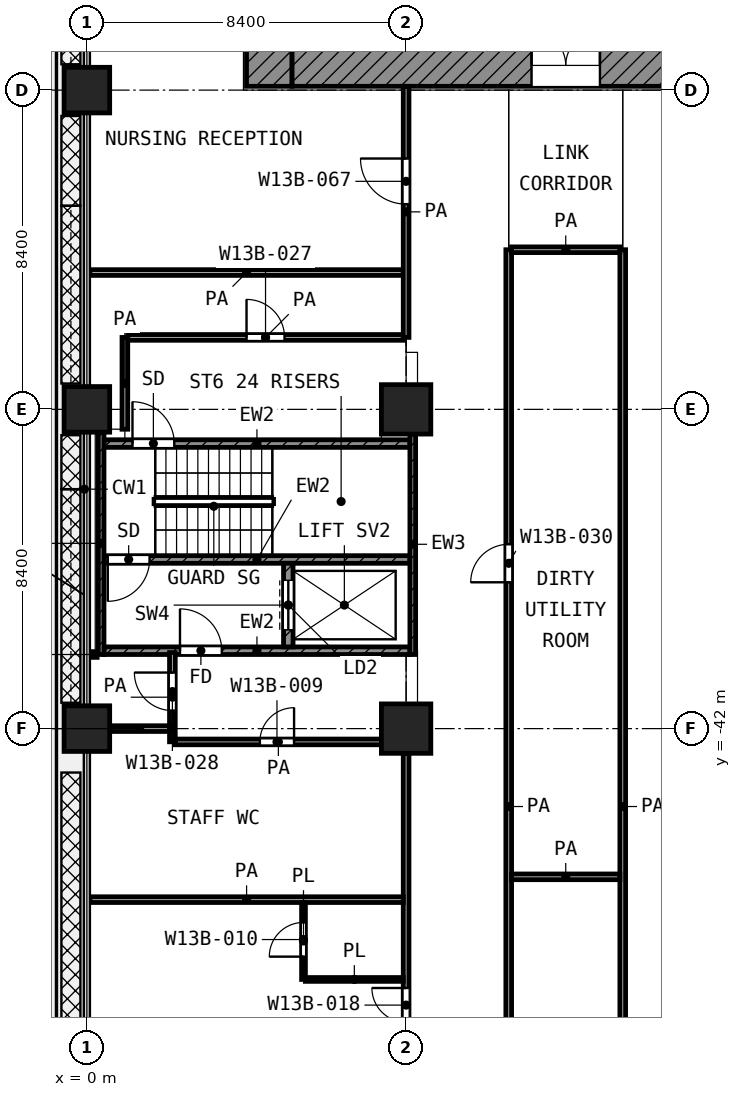
"""IFC4 building model, lengths in metres.
Left out: names, types, materials, properties, quantities, classifications, styles, units other than length and angle.
Written with IfcOpenShell. Run it as: python <this file> out.ifc"""

import sys

from ifc_helpers import new_model, si_unit, direction, frame, frame_2d, origin, origin_2d, place, context, subcontext, project, spatial, rectangle, extrude, element, fill, save


model = new_model("IFC4")
c1 = context("Model", 3, precision=1e-05, world=origin(), true_north=direction((0.0, 1.0)))
c2 = subcontext(c1, "Body", "Model", "MODEL_VIEW")
j1 = project(units=[si_unit("LENGTHUNIT", "METRE"), si_unit("PLANEANGLEUNIT", "RADIAN")], contexts=[c1])
p1 = place(None, origin())
s1 = spatial("IfcSite", under=j1, at=p1, CompositionType="ELEMENT")
p2 = place(p1, origin())
s2 = spatial("IfcBuilding", under=s1, at=p2, CompositionType="ELEMENT")
p3 = place(p2, frame((0.0, 0.0, 89.6)))
s3 = spatial("IfcBuildingStorey", under=s2, at=p3, CompositionType="ELEMENT", Elevation=89.6)
for number, where, z_axis, x_axis in (
    (1, (0.0, -25.2, 0.0), (0.0, 0.0, 1.0), (1.0, 0.0, 0.0)),
    (2, (0.0, -33.6, 0.0), (0.0, 0.0, 1.0), (1.0, 0.0, 0.0)),
):
    element("IfcColumn", number, at=place(p3, frame(where, z_axis=z_axis, x_axis=x_axis)), inside=s3, PredefinedType="COLUMN", context=c2, shape_type="SweptSolid", body=[
        extrude(rectangle(XDim=1.2, YDim=1.2, at=origin_2d()), origin(), (0.0, 0.0, 1.0), 4.2),
    ])
p4 = place(p3, frame((8.4, -33.6, 0.0), z_axis=(0.0, 0.0, 1.0), x_axis=(1.0, 0.0, 0.0)))
e3 = element("IfcColumn", 3, at=p4, inside=s3, PredefinedType="COLUMN", context=c2, shape_type="SweptSolid", body=[
    extrude(rectangle(XDim=1.3, YDim=1.3, at=origin_2d()), origin(), (0.0, 0.0, 1.0), 4.2),
])
p5 = place(p3, frame((0.0, -42.0, 0.0), z_axis=(0.0, 0.0, 1.0), x_axis=(1.0, 0.0, 0.0)))
e4 = element("IfcColumn", 4, at=p5, inside=s3, PredefinedType="COLUMN", context=c2, shape_type="SweptSolid", body=[
    extrude(rectangle(XDim=1.2, YDim=1.2, at=origin_2d()), origin(), (0.0, 0.0, 1.0), 4.2),
])
p6 = place(p3, frame((8.4, -42.0, 0.0), z_axis=(0.0, 0.0, 1.0), x_axis=(1.0, 0.0, 0.0)))
e5 = element("IfcColumn", 5, at=p6, inside=s3, PredefinedType="COLUMN", context=c2, shape_type="SweptSolid", body=[
    extrude(rectangle(XDim=1.3, YDim=1.3, at=origin_2d()), origin(), (0.0, 0.0, 1.0), 4.2),
])
p7 = place(p3, frame((4.8, -25.1, 0.0), z_axis=(0.0, 0.0, 1.0), x_axis=(0.0, 1.0, 0.0)))
e6 = element("IfcWall", 6, at=p7, inside=s3, PredefinedType="SHEAR", context=c2, shape_type="SweptSolid", body=[
    extrude(rectangle(XDim=19.7, YDim=1.2, at=frame_2d((9.85, 0.0))), origin(), (0.0, 0.0, 1.0), 3.7),
])
p8 = place(p7, frame((11.55, 0.0, 0.0)))
e7 = element("IfcOpeningElement", 7, at=p8, cuts=e6, PredefinedType="OPENING", context=c2, shape_type="SweptSolid", body=[
    extrude(rectangle(XDim=1.1, YDim=2.1, at=frame_2d((0.55, 1.05))), frame((0.0, 0.61, 0.0), z_axis=(0.0, -1.0, 0.0), x_axis=(1.0, 0.0, 0.0)), (0.0, 0.0, 1.0), 1.22),
])
p9 = place(p7, frame((2.25, 0.0, 0.0)))
e8 = element("IfcOpeningElement", 8, at=p9, cuts=e6, PredefinedType="OPENING", context=c2, shape_type="SweptSolid", body=[
    extrude(rectangle(XDim=1.1, YDim=2.1, at=frame_2d((0.55, 1.05))), frame((0.0, 0.61, 0.0), z_axis=(0.0, -1.0, 0.0), x_axis=(1.0, 0.0, 0.0)), (0.0, 0.0, 1.0), 1.22),
])
p10 = place(p3, frame((5.4, -24.55, 0.0), z_axis=(0.0, 0.0, 1.0), x_axis=(1.0, 0.0, 0.0)))
e9 = element("IfcWall", 9, at=p10, inside=s3, PredefinedType="SHEAR", context=c2, shape_type="SweptSolid", body=[
    extrude(rectangle(XDim=18.6, YDim=1.1, at=frame_2d((9.3, 0.0))), origin(), (0.0, 0.0, 1.0), 3.7),
])
p11 = place(p10, frame((6.3, 0.0, 0.0)))
e10 = element("IfcOpeningElement", 10, at=p11, cuts=e9, PredefinedType="OPENING", context=c2, shape_type="SweptSolid", body=[
    extrude(rectangle(XDim=1.8, YDim=2.1, at=frame_2d((0.9, 1.05))), frame((0.0, 0.56, 0.0), z_axis=(0.0, -1.0, 0.0), x_axis=(1.0, 0.0, 0.0)), (0.0, 0.0, 1.0), 1.12),
])
p12 = place(p3, frame((0.375, -40.05, 0.0), z_axis=(0.0, 0.0, 1.0), x_axis=(0.0, 1.0, 0.0)))
e11 = element("IfcWall", 11, at=p12, inside=s3, PredefinedType="SHEAR", context=c2, shape_type="SweptSolid", body=[
    extrude(rectangle(XDim=5.85, YDim=0.15, at=frame_2d((2.925, 0.0))), origin(), (0.0, 0.0, 1.0), 3.7),
])
p13 = place(p3, frame((8.575, -40.05, 0.0), z_axis=(0.0, 0.0, 1.0), x_axis=(0.0, 1.0, 0.0)))
e12 = element("IfcWall", 12, at=p13, inside=s3, PredefinedType="SHEAR", context=c2, shape_type="SweptSolid", body=[
    extrude(rectangle(XDim=5.8, YDim=0.15, at=frame_2d((2.9, 0.0))), origin(), (0.0, 0.0, 1.0), 3.7),
])
p14 = place(p3, frame((0.45, -34.5, 0.0), z_axis=(0.0, 0.0, 1.0), x_axis=(1.0, 0.0, 0.0)))
e13 = element("IfcWall", 13, at=p14, inside=s3, PredefinedType="SHEAR", context=c2, shape_type="SweptSolid", body=[
    extrude(rectangle(XDim=8.05, YDim=0.2, at=frame_2d((4.025, 0.0))), origin(), (0.0, 0.0, 1.0), 3.7),
])
p15 = place(p14, frame((0.75, 0.0, 0.0)))
e14 = element("IfcOpeningElement", 14, at=p15, cuts=e13, PredefinedType="OPENING", context=c2, shape_type="SweptSolid", body=[
    extrude(rectangle(XDim=1.1, YDim=2.1, at=frame_2d((0.55, 1.05))), frame((0.0, 0.11, 0.0), z_axis=(0.0, -1.0, 0.0), x_axis=(1.0, 0.0, 0.0)), (0.0, 0.0, 1.0), 0.22),
])
p16 = place(p3, frame((0.45, -37.55, 0.0), z_axis=(0.0, 0.0, 1.0), x_axis=(1.0, 0.0, 0.0)))
e15 = element("IfcWall", 15, at=p16, inside=s3, PredefinedType="SHEAR", context=c2, shape_type="SweptSolid", body=[
    extrude(rectangle(XDim=8.05, YDim=0.2, at=frame_2d((4.025, 0.0))), origin(), (0.0, 0.0, 1.0), 3.7),
])
p17 = place(p16, frame((0.1, 0.0, 0.0)))
e16 = element("IfcOpeningElement", 16, at=p17, cuts=e15, PredefinedType="OPENING", context=c2, shape_type="SweptSolid", body=[
    extrude(rectangle(XDim=1.1, YDim=2.1, at=frame_2d((0.55, 1.05))), frame((0.0, 0.11, 0.0), z_axis=(0.0, -1.0, 0.0), x_axis=(1.0, 0.0, 0.0)), (0.0, 0.0, 1.0), 0.22),
])
p18 = place(p3, frame((0.45, -39.95, 0.0), z_axis=(0.0, 0.0, 1.0), x_axis=(1.0, 0.0, 0.0)))
e17 = element("IfcWall", 17, at=p18, inside=s3, PredefinedType="SHEAR", context=c2, shape_type="SweptSolid", body=[
    extrude(rectangle(XDim=8.05, YDim=0.2, at=frame_2d((4.025, 0.0))), origin(), (0.0, 0.0, 1.0), 3.7),
])
p19 = place(p18, frame((2.0, 0.0, 0.0)))
e18 = element("IfcOpeningElement", 18, at=p19, cuts=e17, PredefinedType="OPENING", context=c2, shape_type="SweptSolid", body=[
    extrude(rectangle(XDim=1.1, YDim=2.1, at=frame_2d((0.55, 1.05))), frame((0.0, 0.11, 0.0), z_axis=(0.0, -1.0, 0.0), x_axis=(1.0, 0.0, 0.0)), (0.0, 0.0, 1.0), 0.22),
])
p20 = place(p3, frame((5.3, -39.85, 0.0), z_axis=(0.0, 0.0, 1.0), x_axis=(0.0, 1.0, 0.0)))
e19 = element("IfcWall", 19, at=p20, inside=s3, PredefinedType="SHEAR", context=c2, shape_type="SweptSolid", body=[
    extrude(rectangle(XDim=2.2, YDim=0.25, at=frame_2d((1.1, 0.0))), origin(), (0.0, 0.0, 1.0), 3.7),
])
p21 = place(p20, frame((0.45, 0.0, 0.0)))
e20 = element("IfcOpeningElement", 20, at=p21, cuts=e19, PredefinedType="OPENING", context=c2, shape_type="SweptSolid", body=[
    extrude(rectangle(XDim=1.3, YDim=2.1, at=frame_2d((0.65, 1.05))), frame((0.0, 0.135, 0.0), z_axis=(0.0, -1.0, 0.0), x_axis=(1.0, 0.0, 0.0)), (0.0, 0.0, 1.0), 0.27),
])
p22 = place(p3, frame((5.75, -48.6, 0.0), z_axis=(0.0, 0.0, 1.0), x_axis=(1.0, 0.0, 0.0)))
e21 = element("IfcWall", 21, at=p22, inside=s3, PredefinedType="PARTITIONING", context=c2, shape_type="SweptSolid", body=[
    extrude(rectangle(XDim=2.575, YDim=0.1, at=frame_2d((1.288, 0.0))), origin(), (0.0, 0.0, 1.0), 3.7),
])
p23 = place(p3, frame((5.7, -48.6, 0.0), z_axis=(0.0, 0.0, 1.0), x_axis=(0.0, 1.0, 0.0)))
e22 = element("IfcWall", 22, at=p23, inside=s3, PredefinedType="PARTITIONING", context=c2, shape_type="SweptSolid", body=[
    extrude(rectangle(XDim=2.025, YDim=0.1, at=frame_2d((1.013, 0.0))), origin(), (0.0, 0.0, 1.0), 3.7),
])
p24 = place(p23, frame((0.6, 0.0, 0.0)))
e23 = element("IfcOpeningElement", 23, at=p24, cuts=e22, PredefinedType="OPENING", context=c2, shape_type="SweptSolid", body=[
    extrude(rectangle(XDim=0.9, YDim=2.1, at=frame_2d((0.45, 1.05))), frame((0.0, 0.06, 0.0), z_axis=(0.0, -1.0, 0.0), x_axis=(1.0, 0.0, 0.0)), (0.0, 0.0, 1.0), 0.12),
])
p25 = place(p3, frame((0.08, -46.5, 0.0), z_axis=(0.0, 0.0, 1.0), x_axis=(1.0, 0.0, 0.0)))
e24 = element("IfcWall", 24, at=p25, inside=s3, PredefinedType="PARTITIONING", context=c2, shape_type="SweptSolid", body=[
    extrude(rectangle(XDim=8.245, YDim=0.15, at=frame_2d((4.123, 0.0))), origin(), (0.0, 0.0, 1.0), 3.7),
])
p26 = place(p3, frame((11.175, -45.9, 0.0), z_axis=(0.0, 0.0, 1.0), x_axis=(1.0, 0.0, 0.0)))
e25 = element("IfcWall", 25, at=p26, inside=s3, PredefinedType="PARTITIONING", context=c2, shape_type="SweptSolid", body=[
    extrude(rectangle(XDim=2.85, YDim=0.15, at=frame_2d((1.425, 0.0))), origin(), (0.0, 0.0, 1.0), 3.7),
])
p27 = place(p3, frame((2.328, -42.35, 0.0), z_axis=(0.0, 0.0, 1.0), x_axis=(1.0, 0.0, 0.0)))
e26 = element("IfcWall", 26, at=p27, inside=s3, PredefinedType="PARTITIONING", context=c2, shape_type="SweptSolid", body=[
    extrude(rectangle(XDim=5.422, YDim=0.15, at=frame_2d((2.711, 0.0))), origin(), (0.0, 0.0, 1.0), 3.7),
])
p28 = place(p27, frame((2.224, 0.0, 0.0)))
e27 = element("IfcOpeningElement", 27, at=p28, cuts=e26, PredefinedType="OPENING", context=c2, shape_type="SweptSolid", body=[
    extrude(rectangle(XDim=0.9, YDim=2.1, at=frame_2d((0.45, 1.05))), frame((0.0, 0.085, 0.0), z_axis=(0.0, -1.0, 0.0), x_axis=(1.0, 0.0, 0.0)), (0.0, 0.0, 1.0), 0.17),
])
p29 = place(p3, frame((0.6, -42.0, 0.0), z_axis=(0.0, 0.0, 1.0), x_axis=(1.0, 0.0, 0.0)))
e28 = element("IfcWall", 28, at=p29, inside=s3, PredefinedType="PARTITIONING", context=c2, shape_type="SweptSolid", body=[
    extrude(rectangle(XDim=1.575, YDim=0.15, at=frame_2d((0.788, 0.0))), origin(), (0.0, 0.0, 1.0), 3.7),
])
p30 = place(p3, frame((0.08, -40.05, 0.0), z_axis=(0.0, 0.0, 1.0), x_axis=(1.0, 0.0, 0.0)))
e29 = element("IfcWall", 29, at=p30, inside=s3, PredefinedType="PARTITIONING", context=c2, shape_type="SweptSolid", body=[
    extrude(rectangle(XDim=0.19, YDim=0.15, at=frame_2d((0.095, 0.0))), origin(), (0.0, 0.0, 1.0), 3.7),
])
p31 = place(p3, frame((1.077, -31.707, 0.0), z_axis=(0.0, 0.0, 1.0), x_axis=(1.0, 0.0, 0.0)))
e30 = element("IfcWall", 30, at=p31, inside=s3, PredefinedType="PARTITIONING", context=c2, shape_type="SweptSolid", body=[
    extrude(rectangle(XDim=7.248, YDim=0.15, at=frame_2d((3.624, 0.0))), origin(), (0.0, 0.0, 1.0), 3.7),
])
p32 = place(p31, frame((3.124, 0.0, 0.0)))
e31 = element("IfcOpeningElement", 31, at=p32, cuts=e30, PredefinedType="OPENING", context=c2, shape_type="SweptSolid", body=[
    extrude(rectangle(XDim=1.0, YDim=2.1, at=frame_2d((0.5, 1.05))), frame((0.0, 0.085, 0.0), z_axis=(0.0, -1.0, 0.0), x_axis=(1.0, 0.0, 0.0)), (0.0, 0.0, 1.0), 0.17),
])
p33 = place(p3, frame((0.08, -30.0, 0.0), z_axis=(0.0, 0.0, 1.0), x_axis=(1.0, 0.0, 0.0)))
e32 = element("IfcWall", 32, at=p33, inside=s3, PredefinedType="PARTITIONING", context=c2, shape_type="SweptSolid", body=[
    extrude(rectangle(XDim=8.245, YDim=0.15, at=frame_2d((4.123, 0.0))), origin(), (0.0, 0.0, 1.0), 3.7),
])
p34 = place(p3, frame((11.175, -29.4, 0.0), z_axis=(0.0, 0.0, 1.0), x_axis=(1.0, 0.0, 0.0)))
e33 = element("IfcWall", 33, at=p34, inside=s3, PredefinedType="PARTITIONING", context=c2, shape_type="SweptSolid", body=[
    extrude(rectangle(XDim=2.85, YDim=0.15, at=frame_2d((1.425, 0.0))), origin(), (0.0, 0.0, 1.0), 3.7),
])
p35 = place(p3, frame((1.0, -34.123, 0.0), z_axis=(0.0, 0.0, 1.0), x_axis=(0.0, 1.0, 0.0)))
e34 = element("IfcWall", 34, at=p35, inside=s3, PredefinedType="PARTITIONING", context=c2, shape_type="SweptSolid", body=[
    extrude(rectangle(XDim=2.415, YDim=0.15, at=frame_2d((1.208, 0.0))), origin(), (0.0, 0.0, 1.0), 3.7),
])
p36 = place(p3, frame((2.25, -42.347, 0.0), z_axis=(0.0, 0.0, 1.0), x_axis=(0.0, 1.0, 0.0)))
e35 = element("IfcWall", 35, at=p36, inside=s3, PredefinedType="PARTITIONING", context=c2, shape_type="SweptSolid", body=[
    extrude(rectangle(XDim=2.347, YDim=0.15, at=frame_2d((1.173, 0.0))), origin(), (0.0, 0.0, 1.0), 3.7),
])
p37 = place(p36, frame((0.822, 0.0, 0.0)))
e36 = element("IfcOpeningElement", 36, at=p37, cuts=e35, PredefinedType="OPENING", context=c2, shape_type="SweptSolid", body=[
    extrude(rectangle(XDim=1.0, YDim=2.1, at=frame_2d((0.5, 1.05))), frame((0.0, 0.085, 0.0), z_axis=(0.0, -1.0, 0.0), x_axis=(1.0, 0.0, 0.0)), (0.0, 0.0, 1.0), 0.17),
])
p38 = place(p3, frame((8.4, -66.55, 0.0), z_axis=(0.0, 0.0, 1.0), x_axis=(0.0, 1.0, 0.0)))
e37 = element("IfcWall", 37, at=p38, inside=s3, PredefinedType="PARTITIONING", context=c2, shape_type="SweptSolid", body=[
    extrude(rectangle(XDim=23.9, YDim=0.15, at=frame_2d((11.95, 0.0))), origin(), (0.0, 0.0, 1.0), 3.7),
])
p39 = place(p38, frame((16.825, 0.0, 0.0)))
e38 = element("IfcOpeningElement", 38, at=p39, cuts=e37, PredefinedType="OPENING", context=c2, shape_type="SweptSolid", body=[
    extrude(rectangle(XDim=0.9, YDim=2.1, at=frame_2d((0.45, 1.05))), frame((0.0, 0.085, 0.0), z_axis=(0.0, -1.0, 0.0), x_axis=(1.0, 0.0, 0.0)), (0.0, 0.0, 1.0), 0.17),
])
p40 = place(p38, frame((13.0, 0.0, 0.0)))
e39 = element("IfcOpeningElement", 39, at=p40, cuts=e37, PredefinedType="OPENING", context=c2, shape_type="SweptSolid", body=[
    extrude(rectangle(XDim=1.2, YDim=2.1, at=frame_2d((0.6, 1.05))), frame((0.0, 0.085, 0.0), z_axis=(0.0, -1.0, 0.0), x_axis=(1.0, 0.0, 0.0)), (0.0, 0.0, 1.0), 0.17),
])
p41 = place(p38, frame((5.85, 0.0, 0.0)))
e40 = element("IfcOpeningElement", 40, at=p41, cuts=e37, PredefinedType="OPENING", context=c2, shape_type="SweptSolid", body=[
    extrude(rectangle(XDim=1.2, YDim=2.1, at=frame_2d((0.6, 1.05))), frame((0.0, 0.085, 0.0), z_axis=(0.0, -1.0, 0.0), x_axis=(1.0, 0.0, 0.0)), (0.0, 0.0, 1.0), 0.17),
])
p42 = place(p38, frame((8.45, 0.0, 0.0)))
e41 = element("IfcOpeningElement", 41, at=p42, cuts=e37, PredefinedType="OPENING", context=c2, shape_type="SweptSolid", body=[
    extrude(rectangle(XDim=1.2, YDim=2.1, at=frame_2d((0.6, 1.05))), frame((0.0, 0.085, 0.0), z_axis=(0.0, -1.0, 0.0), x_axis=(1.0, 0.0, 0.0)), (0.0, 0.0, 1.0), 0.17),
])
p43 = place(p38, frame((4.0, 0.0, 0.0)))
e42 = element("IfcOpeningElement", 42, at=p43, cuts=e37, PredefinedType="OPENING", context=c2, shape_type="SweptSolid", body=[
    extrude(rectangle(XDim=1.2, YDim=2.1, at=frame_2d((0.6, 1.05))), frame((0.0, 0.085, 0.0), z_axis=(0.0, -1.0, 0.0), x_axis=(1.0, 0.0, 0.0)), (0.0, 0.0, 1.0), 0.17),
])
p44 = place(p38, frame((1.325, 0.0, 0.0)))
e43 = element("IfcOpeningElement", 43, at=p44, cuts=e37, PredefinedType="OPENING", context=c2, shape_type="SweptSolid", body=[
    extrude(rectangle(XDim=0.9, YDim=2.1, at=frame_2d((0.45, 1.05))), frame((0.0, 0.085, 0.0), z_axis=(0.0, -1.0, 0.0), x_axis=(1.0, 0.0, 0.0)), (0.0, 0.0, 1.0), 0.17),
])
p45 = place(p3, frame((8.4, -31.707, 0.0), z_axis=(0.0, 0.0, 1.0), x_axis=(0.0, 1.0, 0.0)))
e44 = element("IfcWall", 44, at=p45, inside=s3, PredefinedType="PARTITIONING", context=c2, shape_type="SweptSolid", body=[
    extrude(rectangle(XDim=6.607, YDim=0.15, at=frame_2d((3.303, 0.0))), origin(), (0.0, 0.0, 1.0), 3.7),
])
p46 = place(p45, frame((3.507, 0.0, 0.0)))
e45 = element("IfcOpeningElement", 45, at=p46, cuts=e44, PredefinedType="OPENING", context=c2, shape_type="SweptSolid", body=[
    extrude(rectangle(XDim=1.2, YDim=2.1, at=frame_2d((0.6, 1.05))), frame((0.0, 0.085, 0.0), z_axis=(0.0, -1.0, 0.0), x_axis=(1.0, 0.0, 0.0)), (0.0, 0.0, 1.0), 0.17),
])
p47 = place(p3, frame((11.1, -58.7, 0.0), z_axis=(0.0, 0.0, 1.0), x_axis=(0.0, 1.0, 0.0)))
e46 = element("IfcWall", 46, at=p47, inside=s3, PredefinedType="PARTITIONING", context=c2, shape_type="SweptSolid", body=[
    extrude(rectangle(XDim=29.3, YDim=0.15, at=frame_2d((14.65, 0.0))), origin(), (0.0, 0.0, 1.0), 3.7),
])
p48 = place(p47, frame((20.55, 0.0, 0.0)))
e47 = element("IfcOpeningElement", 47, at=p48, cuts=e46, PredefinedType="OPENING", context=c2, shape_type="SweptSolid", body=[
    extrude(rectangle(XDim=1.0, YDim=2.1, at=frame_2d((0.5, 1.05))), frame((0.0, 0.085, 0.0), z_axis=(0.0, -1.0, 0.0), x_axis=(1.0, 0.0, 0.0)), (0.0, 0.0, 1.0), 0.17),
])
p49 = place(p47, frame((1.35, 0.0, 0.0)))
e48 = element("IfcOpeningElement", 48, at=p49, cuts=e46, PredefinedType="OPENING", context=c2, shape_type="SweptSolid", body=[
    extrude(rectangle(XDim=1.0, YDim=2.1, at=frame_2d((0.5, 1.05))), frame((0.0, 0.085, 0.0), z_axis=(0.0, -1.0, 0.0), x_axis=(1.0, 0.0, 0.0)), (0.0, 0.0, 1.0), 0.17),
])
p50 = place(p3, frame((14.1, -58.7, 0.0), z_axis=(0.0, 0.0, 1.0), x_axis=(0.0, 1.0, 0.0)))
e49 = element("IfcWall", 49, at=p50, inside=s3, PredefinedType="PARTITIONING", context=c2, shape_type="SweptSolid", body=[
    extrude(rectangle(XDim=29.3, YDim=0.15, at=frame_2d((14.65, 0.0))), origin(), (0.0, 0.0, 1.0), 3.7),
])
p51 = place(p50, frame((7.8, 0.0, 0.0)))
e50 = element("IfcOpeningElement", 50, at=p51, cuts=e49, PredefinedType="OPENING", context=c2, shape_type="SweptSolid", body=[
    extrude(rectangle(XDim=1.0, YDim=2.1, at=frame_2d((0.5, 1.05))), frame((0.0, 0.085, 0.0), z_axis=(0.0, -1.0, 0.0), x_axis=(1.0, 0.0, 0.0)), (0.0, 0.0, 1.0), 0.17),
])
p52 = place(p11, origin())
e51 = element("IfcDoor", 51, at=p52, inside=s3, OperationType="DOUBLE_DOOR_SINGLE_SWING", PredefinedType="DOOR", context=c2, shape_type="SweptSolid", body=[
    extrude(rectangle(XDim=1.8, YDim=2.1, at=frame_2d((0.9, 1.05))), frame((0.0, 0.025, 0.0), z_axis=(0.0, -1.0, 0.0), x_axis=(1.0, 0.0, 0.0)), (0.0, 0.0, 1.0), 0.05),
])
fill(e10, e51)
p53 = place(p15, origin())
e52 = element("IfcDoor", 52, at=p53, inside=s3, OperationType="SINGLE_SWING_LEFT", PredefinedType="DOOR", context=c2, shape_type="SweptSolid", body=[
    extrude(rectangle(XDim=1.1, YDim=2.1, at=frame_2d((0.55, 1.05))), frame((0.0, 0.025, 0.0), z_axis=(0.0, -1.0, 0.0), x_axis=(1.0, 0.0, 0.0)), (0.0, 0.0, 1.0), 0.05),
])
fill(e14, e52)
p54 = place(p17, frame((1.1, 0.0, 0.0), z_axis=(0.0, 0.0, 1.0), x_axis=(-1.0, 0.0, 0.0)))
e53 = element("IfcDoor", 53, at=p54, inside=s3, OperationType="SINGLE_SWING_LEFT", PredefinedType="DOOR", context=c2, shape_type="SweptSolid", body=[
    extrude(rectangle(XDim=1.1, YDim=2.1, at=frame_2d((0.55, 1.05))), frame((0.0, 0.025, 0.0), z_axis=(0.0, -1.0, 0.0), x_axis=(1.0, 0.0, 0.0)), (0.0, 0.0, 1.0), 0.05),
])
fill(e16, e53)
p55 = place(p21, origin())
e54 = element("IfcDoor", 54, at=p55, inside=s3, OperationType="DOUBLE_DOOR_SLIDING", PredefinedType="DOOR", context=c2, shape_type="SweptSolid", body=[
    extrude(rectangle(XDim=1.3, YDim=2.1, at=frame_2d((0.65, 1.05))), frame((0.0, 0.025, 0.0), z_axis=(0.0, -1.0, 0.0), x_axis=(1.0, 0.0, 0.0)), (0.0, 0.0, 1.0), 0.05),
])
fill(e20, e54)
p56 = place(p19, origin())
e55 = element("IfcDoor", 55, at=p56, inside=s3, OperationType="SINGLE_SWING_LEFT", PredefinedType="DOOR", context=c2, shape_type="SweptSolid", body=[
    extrude(rectangle(XDim=1.1, YDim=2.1, at=frame_2d((0.55, 1.05))), frame((0.0, 0.025, 0.0), z_axis=(0.0, -1.0, 0.0), x_axis=(1.0, 0.0, 0.0)), (0.0, 0.0, 1.0), 0.05),
])
fill(e18, e55)
p57 = place(p46, origin())
e56 = element("IfcDoor", 56, at=p57, inside=s3, OperationType="SINGLE_SWING_RIGHT", PredefinedType="DOOR", context=c2, shape_type="SweptSolid", body=[
    extrude(rectangle(XDim=1.2, YDim=2.1, at=frame_2d((0.6, 1.05))), frame((0.0, 0.025, 0.0), z_axis=(0.0, -1.0, 0.0), x_axis=(1.0, 0.0, 0.0)), (0.0, 0.0, 1.0), 0.05),
])
fill(e45, e56)
p58 = place(p32, origin())
e57 = element("IfcDoor", 57, at=p58, inside=s3, OperationType="SINGLE_SWING_LEFT", PredefinedType="DOOR", context=c2, shape_type="SweptSolid", body=[
    extrude(rectangle(XDim=1.0, YDim=2.1, at=frame_2d((0.5, 1.05))), frame((0.0, 0.025, 0.0), z_axis=(0.0, -1.0, 0.0), x_axis=(1.0, 0.0, 0.0)), (0.0, 0.0, 1.0), 0.05),
])
fill(e31, e57)
p59 = place(p37, origin())
e58 = element("IfcDoor", 58, at=p59, inside=s3, OperationType="SINGLE_SWING_RIGHT", PredefinedType="DOOR", context=c2, shape_type="SweptSolid", body=[
    extrude(rectangle(XDim=1.0, YDim=2.1, at=frame_2d((0.5, 1.05))), frame((0.0, 0.025, 0.0), z_axis=(0.0, -1.0, 0.0), x_axis=(1.0, 0.0, 0.0)), (0.0, 0.0, 1.0), 0.05),
])
fill(e36, e58)
p60 = place(p28, origin())
e59 = element("IfcDoor", 59, at=p60, inside=s3, OperationType="SINGLE_SWING_RIGHT", PredefinedType="DOOR", context=c2, shape_type="SweptSolid", body=[
    extrude(rectangle(XDim=0.9, YDim=2.1, at=frame_2d((0.45, 1.05))), frame((0.0, 0.025, 0.0), z_axis=(0.0, -1.0, 0.0), x_axis=(1.0, 0.0, 0.0)), (0.0, 0.0, 1.0), 0.05),
])
fill(e27, e59)
p61 = place(p39, origin())
e60 = element("IfcDoor", 60, at=p61, inside=s3, OperationType="SINGLE_SWING_RIGHT", PredefinedType="DOOR", context=c2, shape_type="SweptSolid", body=[
    extrude(rectangle(XDim=0.9, YDim=2.1, at=frame_2d((0.45, 1.05))), frame((0.0, 0.025, 0.0), z_axis=(0.0, -1.0, 0.0), x_axis=(1.0, 0.0, 0.0)), (0.0, 0.0, 1.0), 0.05),
])
fill(e38, e60)
p62 = place(p24, origin())
e61 = element("IfcDoor", 61, at=p62, inside=s3, OperationType="SINGLE_SWING_LEFT", PredefinedType="DOOR", context=c2, shape_type="SweptSolid", body=[
    extrude(rectangle(XDim=0.9, YDim=2.1, at=frame_2d((0.45, 1.05))), frame((0.0, 0.025, 0.0), z_axis=(0.0, -1.0, 0.0), x_axis=(1.0, 0.0, 0.0)), (0.0, 0.0, 1.0), 0.05),
])
fill(e23, e61)
p63 = place(p48, origin())
e62 = element("IfcDoor", 62, at=p63, inside=s3, OperationType="SINGLE_SWING_LEFT", PredefinedType="DOOR", context=c2, shape_type="SweptSolid", body=[
    extrude(rectangle(XDim=1.0, YDim=2.1, at=frame_2d((0.5, 1.05))), frame((0.0, 0.025, 0.0), z_axis=(0.0, -1.0, 0.0), x_axis=(1.0, 0.0, 0.0)), (0.0, 0.0, 1.0), 0.05),
])
fill(e47, e62)
save(model, sys.argv[1])
